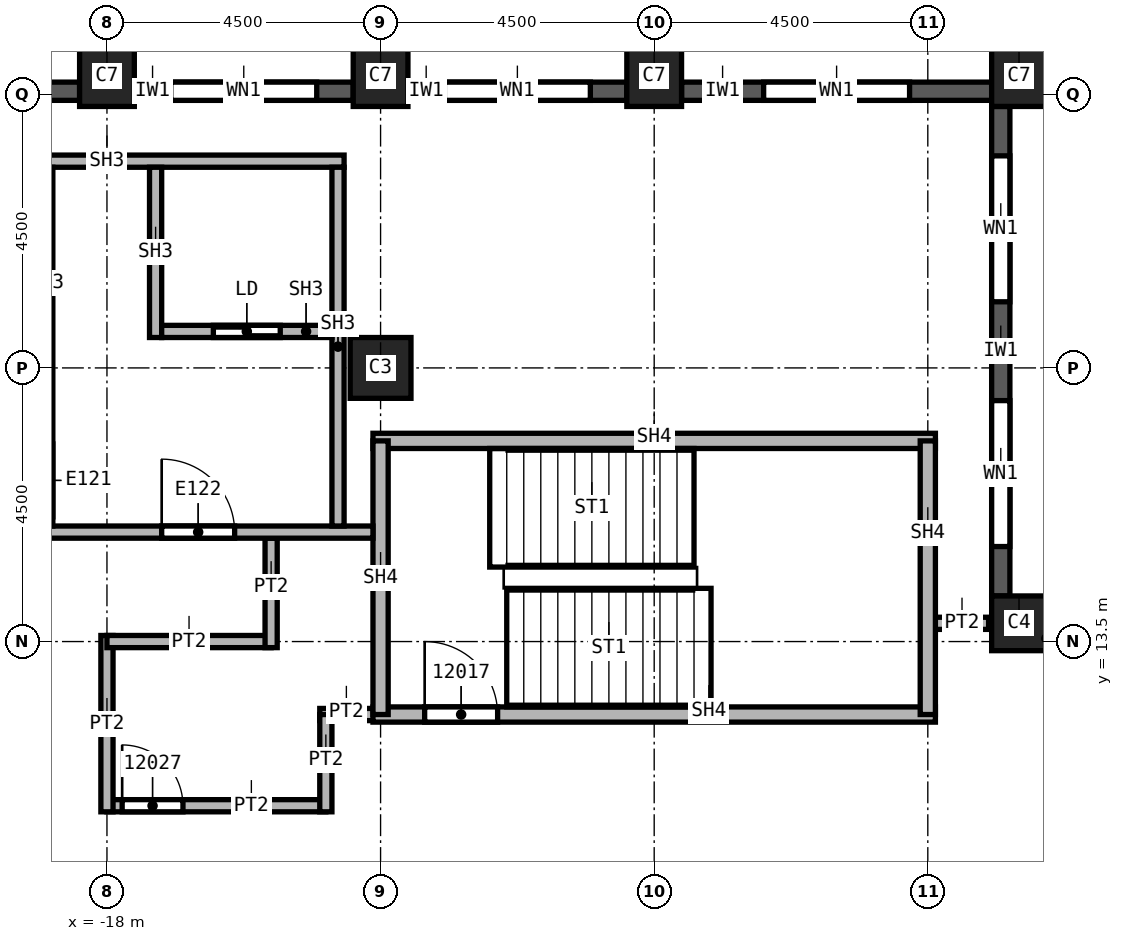
"""IFC4 building model, lengths in metres.
Left out: names, types, materials, properties, quantities, classifications, styles, units other than length and angle.
Written with IfcOpenShell. Run it as: python <this file> out.ifc"""

import sys

from ifc_helpers import new_model, si_unit, direction, frame, frame_2d, origin, origin_2d, place, context, subcontext, project, spatial, rectangle, extrude, element, fill, save


model = new_model("IFC4")
c1 = context("Model", 3, precision=1e-05, world=origin(), true_north=direction((0.0, 1.0)))
c2 = subcontext(c1, "Body", "Model", "MODEL_VIEW")
j1 = project(units=[si_unit("LENGTHUNIT", "METRE"), si_unit("PLANEANGLEUNIT", "RADIAN")], contexts=[c1])
p1 = place(None, origin())
s1 = spatial("IfcSite", under=j1, at=p1, CompositionType="ELEMENT")
p2 = place(p1, origin())
s2 = spatial("IfcBuilding", under=s1, at=p2, CompositionType="ELEMENT")
p3 = place(p2, frame((0.0, 0.0, 196.0)))
s3 = spatial("IfcBuildingStorey", under=s2, at=p3, CompositionType="ELEMENT", Elevation=196.0)
p4 = place(p3, frame((-13.5, 18.0, 0.0), z_axis=(0.0, 0.0, 1.0), x_axis=(1.0, 0.0, 0.0)))
e1 = element("IfcColumn", 1, at=p4, inside=s3, PredefinedType="COLUMN", context=c2, shape_type="SweptSolid", body=[
    extrude(rectangle(XDim=1.0, YDim=1.0, at=origin_2d()), origin(), (0.0, 0.0, 1.0), 3.72),
])
for number, where, z_axis, x_axis in (
    (2, (-3.0, 22.8, 0.0), (0.0, 0.0, 1.0), (1.0, 0.0, 0.0)),
    (3, (-9.0, 22.8, 0.0), (0.0, 0.0, 1.0), (1.0, 0.0, 0.0)),
    (4, (-13.5, 22.8, 0.0), (0.0, 0.0, 1.0), (1.0, 0.0, 0.0)),
    (5, (-18.0, 22.8, 0.0), (0.0, 0.0, 1.0), (1.0, 0.0, 0.0)),
):
    element("IfcColumn", number, at=place(p3, frame(where, z_axis=z_axis, x_axis=x_axis)), inside=s3, PredefinedType="COLUMN", context=c2, shape_type="SweptSolid", body=[
        extrude(rectangle(XDim=0.9, YDim=1.0, at=origin_2d()), origin(), (0.0, 0.0, 1.0), 3.72),
    ])
p5 = place(p3, frame((-3.0, 13.8, 0.0), z_axis=(0.0, 0.0, 1.0), x_axis=(1.0, 0.0, 0.0)))
e6 = element("IfcColumn", 6, at=p5, inside=s3, PredefinedType="COLUMN", context=c2, shape_type="SweptSolid", body=[
    extrude(rectangle(XDim=0.9, YDim=0.9, at=origin_2d()), origin(), (0.0, 0.0, 1.0), 3.72),
])
p6 = place(p3, frame((-3.3, 14.25, 0.0), z_axis=(0.0, 0.0, 1.0), x_axis=(0.0, 1.0, 0.0)))
e7 = element("IfcWall", 7, at=p6, inside=s3, PredefinedType="SOLIDWALL", context=c2, shape_type="SweptSolid", body=[
    extrude(rectangle(XDim=8.05, YDim=0.3, at=frame_2d((4.025, 0.0))), origin(), (0.0, 0.0, 1.0), 3.12),
])
p7 = place(p6, frame((0.812, 0.0, 0.8)))
e8 = element("IfcOpeningElement", 8, at=p7, cuts=e7, PredefinedType="OPENING", context=c2, shape_type="SweptSolid", body=[
    extrude(rectangle(XDim=2.4, YDim=1.95, at=frame_2d((1.2, 0.975))), frame((0.0, 0.15, 0.0), z_axis=(0.0, -1.0, 0.0), x_axis=(1.0, 0.0, 0.0)), (0.0, 0.0, 1.0), 0.3),
])
p8 = place(p6, frame((4.837, 0.0, 0.8)))
e9 = element("IfcOpeningElement", 9, at=p8, cuts=e7, PredefinedType="OPENING", context=c2, shape_type="SweptSolid", body=[
    extrude(rectangle(XDim=2.4, YDim=1.95, at=frame_2d((1.2, 0.975))), frame((0.0, 0.15, 0.0), z_axis=(0.0, -1.0, 0.0), x_axis=(1.0, 0.0, 0.0)), (0.0, 0.0, 1.0), 0.3),
])
p9 = place(p3, frame((-3.45, 22.55, 0.0), z_axis=(0.0, 0.0, 1.0), x_axis=(-1.0, 0.0, 0.0)))
e10 = element("IfcWall", 10, at=p9, inside=s3, PredefinedType="SOLIDWALL", context=c2, shape_type="SweptSolid", body=[
    extrude(rectangle(XDim=5.1, YDim=0.3, at=frame_2d((2.55, 0.0))), origin(), (0.0, 0.0, 1.0), 3.12),
])
p10 = place(p9, frame((1.35, 0.0, 0.8)))
e11 = element("IfcOpeningElement", 11, at=p10, cuts=e10, PredefinedType="OPENING", context=c2, shape_type="SweptSolid", body=[
    extrude(rectangle(XDim=2.4, YDim=1.95, at=frame_2d((1.2, 0.975))), frame((0.0, 0.15, 0.0), z_axis=(0.0, -1.0, 0.0), x_axis=(1.0, 0.0, 0.0)), (0.0, 0.0, 1.0), 0.3),
])
p11 = place(p3, frame((-9.45, 22.55, 0.0), z_axis=(0.0, 0.0, 1.0), x_axis=(-1.0, 0.0, 0.0)))
e12 = element("IfcWall", 12, at=p11, inside=s3, PredefinedType="SOLIDWALL", context=c2, shape_type="SweptSolid", body=[
    extrude(rectangle(XDim=3.6, YDim=0.3, at=frame_2d((1.8, 0.0))), origin(), (0.0, 0.0, 1.0), 3.12),
])
p12 = place(p11, frame((0.6, 0.0, 0.8)))
e13 = element("IfcOpeningElement", 13, at=p12, cuts=e12, PredefinedType="OPENING", context=c2, shape_type="SweptSolid", body=[
    extrude(rectangle(XDim=2.4, YDim=1.95, at=frame_2d((1.2, 0.975))), frame((0.0, 0.15, 0.0), z_axis=(0.0, -1.0, 0.0), x_axis=(1.0, 0.0, 0.0)), (0.0, 0.0, 1.0), 0.3),
])
p13 = place(p3, frame((-13.95, 22.55, 0.0), z_axis=(0.0, 0.0, 1.0), x_axis=(-1.0, 0.0, 0.0)))
e14 = element("IfcWall", 14, at=p13, inside=s3, PredefinedType="SOLIDWALL", context=c2, shape_type="SweptSolid", body=[
    extrude(rectangle(XDim=3.6, YDim=0.3, at=frame_2d((1.8, 0.0))), origin(), (0.0, 0.0, 1.0), 3.12),
])
p14 = place(p13, frame((0.6, 0.0, 0.8)))
e15 = element("IfcOpeningElement", 15, at=p14, cuts=e14, PredefinedType="OPENING", context=c2, shape_type="SweptSolid", body=[
    extrude(rectangle(XDim=2.4, YDim=1.95, at=frame_2d((1.2, 0.975))), frame((0.0, 0.15, 0.0), z_axis=(0.0, -1.0, 0.0), x_axis=(1.0, 0.0, 0.0)), (0.0, 0.0, 1.0), 0.3),
])
p15 = place(p3, frame((-18.45, 22.55, 0.0), z_axis=(0.0, 0.0, 1.0), x_axis=(-1.0, 0.0, 0.0)))
e16 = element("IfcWall", 16, at=p15, inside=s3, PredefinedType="SOLIDWALL", context=c2, shape_type="SweptSolid", body=[
    extrude(rectangle(XDim=3.6, YDim=0.3, at=frame_2d((1.8, 0.0))), origin(), (0.0, 0.0, 1.0), 3.12),
])
p16 = place(p15, frame((0.6, 0.0, 0.8)))
e17 = element("IfcOpeningElement", 17, at=p16, cuts=e16, PredefinedType="OPENING", context=c2, shape_type="SweptSolid", body=[
    extrude(rectangle(XDim=2.4, YDim=1.95, at=frame_2d((1.2, 0.975))), frame((0.0, 0.15, 0.0), z_axis=(0.0, -1.0, 0.0), x_axis=(1.0, 0.0, 0.0)), (0.0, 0.0, 1.0), 0.3),
])
p17 = place(p3, frame((-18.0, 10.8, 0.0), z_axis=(0.0, 0.0, 1.0), x_axis=(1.0, 0.0, 0.0)))
e18 = element("IfcWall", 18, at=p17, inside=s3, PredefinedType="PARTITIONING", context=c2, shape_type="SweptSolid", body=[
    extrude(rectangle(XDim=3.6, YDim=0.2, at=frame_2d((1.8, 0.0))), origin(), (0.0, 0.0, 1.0), 3.72),
])
p18 = place(p17, frame((0.25, 0.0, 0.0)))
e19 = element("IfcOpeningElement", 19, at=p18, cuts=e18, PredefinedType="OPENING", context=c2, shape_type="SweptSolid", body=[
    extrude(rectangle(XDim=1.0, YDim=2.1, at=frame_2d((0.5, 1.05))), frame((0.0, 0.1, 0.0), z_axis=(0.0, -1.0, 0.0), x_axis=(1.0, 0.0, 0.0)), (0.0, 0.0, 1.0), 0.2),
])
p19 = place(p3, frame((-18.0, 13.6, 0.0), z_axis=(0.0, 0.0, 1.0), x_axis=(0.0, -1.0, 0.0)))
e20 = element("IfcWall", 20, at=p19, inside=s3, PredefinedType="PARTITIONING", context=c2, shape_type="SweptSolid", body=[
    extrude(rectangle(XDim=2.9, YDim=0.2, at=frame_2d((1.45, 0.0))), origin(), (0.0, 0.0, 1.0), 3.72),
])
p20 = place(p3, frame((-15.3, 13.5, 0.0), z_axis=(0.0, 0.0, 1.0), x_axis=(-1.0, 0.0, 0.0)))
e21 = element("IfcWall", 21, at=p20, inside=s3, PredefinedType="PARTITIONING", context=c2, shape_type="SweptSolid", body=[
    extrude(rectangle(XDim=2.7, YDim=0.2, at=frame_2d((1.35, 0.0))), origin(), (0.0, 0.0, 1.0), 3.72),
])
p21 = place(p3, frame((-15.3, 15.2, 0.0), z_axis=(0.0, 0.0, 1.0), x_axis=(0.0, -1.0, 0.0)))
e22 = element("IfcWall", 22, at=p21, inside=s3, PredefinedType="PARTITIONING", context=c2, shape_type="SweptSolid", body=[
    extrude(rectangle(XDim=1.8, YDim=0.2, at=frame_2d((0.9, 0.0))), origin(), (0.0, 0.0, 1.0), 3.72),
])
p22 = place(p3, frame((-14.5, 12.3, 0.0), z_axis=(0.0, 0.0, 1.0), x_axis=(1.0, 0.0, 0.0)))
e23 = element("IfcWall", 23, at=p22, inside=s3, PredefinedType="PARTITIONING", context=c2, shape_type="SweptSolid", body=[
    extrude(rectangle(XDim=1.125, YDim=0.2, at=frame_2d((0.562, 0.0))), origin(), (0.0, 0.0, 1.0), 3.72),
])
p23 = place(p3, frame((-14.4, 10.7, 0.0), z_axis=(0.0, 0.0, 1.0), x_axis=(0.0, 1.0, 0.0)))
e24 = element("IfcWall", 24, at=p23, inside=s3, PredefinedType="PARTITIONING", context=c2, shape_type="SweptSolid", body=[
    extrude(rectangle(XDim=1.6, YDim=0.2, at=frame_2d((0.8, 0.0))), origin(), (0.0, 0.0, 1.0), 3.72),
])
p24 = place(p3, frame((-4.5, 13.8, 0.0), z_axis=(0.0, 0.0, 1.0), x_axis=(1.0, 0.0, 0.0)))
e25 = element("IfcWall", 25, at=p24, inside=s3, PredefinedType="PARTITIONING", context=c2, shape_type="SweptSolid", body=[
    extrude(rectangle(XDim=1.0, YDim=0.2, at=frame_2d((0.5, 0.0))), origin(), (0.0, 0.0, 1.0), 3.72),
])
p25 = place(p3, frame((-13.625, 12.3, 0.0), z_axis=(0.0, 0.0, 1.0), x_axis=(1.0, 0.0, 0.0)))
e26 = element("IfcWall", 26, at=p25, inside=s3, PredefinedType="SOLIDWALL", context=c2, shape_type="SweptSolid", body=[
    extrude(rectangle(XDim=9.25, YDim=0.25, at=frame_2d((4.625, 0.0))), origin(), (0.0, 0.0, 1.0), 3.72),
])
p26 = place(p25, frame((0.85, 0.0, 0.0)))
e27 = element("IfcOpeningElement", 27, at=p26, cuts=e26, PredefinedType="OPENING", context=c2, shape_type="SweptSolid", body=[
    extrude(rectangle(XDim=1.2, YDim=2.1, at=frame_2d((0.6, 1.05))), frame((0.0, 0.125, 0.0), z_axis=(0.0, -1.0, 0.0), x_axis=(1.0, 0.0, 0.0)), (0.0, 0.0, 1.0), 0.25),
])
p27 = place(p3, frame((-13.625, 16.8, 0.0), z_axis=(0.0, 0.0, 1.0), x_axis=(1.0, 0.0, 0.0)))
e28 = element("IfcWall", 28, at=p27, inside=s3, PredefinedType="SOLIDWALL", context=c2, shape_type="SweptSolid", body=[
    extrude(rectangle(XDim=9.25, YDim=0.25, at=frame_2d((4.625, 0.0))), origin(), (0.0, 0.0, 1.0), 3.72),
])
for number, where, z_axis, x_axis in (
    (29, (-13.5, 12.3, 0.0), (0.0, 0.0, 1.0), (0.0, 1.0, 0.0)),
    (30, (-4.5, 16.8, 0.0), (0.0, 0.0, 1.0), (0.0, -1.0, 0.0)),
):
    element("IfcWall", number, at=place(p3, frame(where, z_axis=z_axis, x_axis=x_axis)), inside=s3, PredefinedType="SOLIDWALL", context=c2, shape_type="SweptSolid", body=[
        extrude(rectangle(XDim=4.5, YDim=0.25, at=frame_2d((2.25, 0.0))), origin(), (0.0, 0.0, 1.0), 3.72),
    ])
p28 = place(p3, frame((-21.9, 15.3, 0.0), z_axis=(0.0, 0.0, 1.0), x_axis=(1.0, 0.0, 0.0)))
e31 = element("IfcWall", 31, at=p28, inside=s3, PredefinedType="SOLIDWALL", context=c2, shape_type="SweptSolid", body=[
    extrude(rectangle(XDim=8.275, YDim=0.2, at=frame_2d((4.137, 0.0))), origin(), (0.0, 0.0, 1.0), 3.72),
])
p29 = place(p28, frame((4.8, 0.0, 0.0)))
e32 = element("IfcOpeningElement", 32, at=p29, cuts=e31, PredefinedType="OPENING", context=c2, shape_type="SweptSolid", body=[
    extrude(rectangle(XDim=1.2, YDim=2.1, at=frame_2d((0.6, 1.05))), frame((0.0, 0.1, 0.0), z_axis=(0.0, -1.0, 0.0), x_axis=(1.0, 0.0, 0.0)), (0.0, 0.0, 1.0), 0.2),
])
p30 = place(p3, frame((-21.9, 21.4, 0.0), z_axis=(0.0, 0.0, 1.0), x_axis=(1.0, 0.0, 0.0)))
e33 = element("IfcWall", 33, at=p30, inside=s3, PredefinedType="SOLIDWALL", context=c2, shape_type="SweptSolid", body=[
    extrude(rectangle(XDim=7.8, YDim=0.2, at=frame_2d((3.9, 0.0))), origin(), (0.0, 0.0, 1.0), 3.72),
])
p31 = place(p3, frame((-14.2, 15.4, 0.0), z_axis=(0.0, 0.0, 1.0), x_axis=(0.0, 1.0, 0.0)))
e34 = element("IfcWall", 34, at=p31, inside=s3, PredefinedType="SOLIDWALL", context=c2, shape_type="SweptSolid", body=[
    extrude(rectangle(XDim=5.9, YDim=0.2, at=frame_2d((2.95, 0.0))), origin(), (0.0, 0.0, 1.0), 3.72),
])
p32 = place(p3, frame((-18.99, 15.4, 0.0), z_axis=(0.0, 0.0, 1.0), x_axis=(0.0, 1.0, 0.0)))
e35 = element("IfcWall", 35, at=p32, inside=s3, PredefinedType="SOLIDWALL", context=c2, shape_type="SweptSolid", body=[
    extrude(rectangle(XDim=5.9, YDim=0.2, at=frame_2d((2.95, 0.0))), origin(), (0.0, 0.0, 1.0), 3.72),
])
p33 = place(p32, frame((0.15, 0.0, 0.0)))
e36 = element("IfcOpeningElement", 36, at=p33, cuts=e35, PredefinedType="OPENING", context=c2, shape_type="SweptSolid", body=[
    extrude(rectangle(XDim=1.2, YDim=2.1, at=frame_2d((0.6, 1.05))), frame((0.0, 0.1, 0.0), z_axis=(0.0, -1.0, 0.0), x_axis=(1.0, 0.0, 0.0)), (0.0, 0.0, 1.0), 0.2),
])
p34 = place(p3, frame((-17.2, 18.5, 0.0), z_axis=(0.0, 0.0, 1.0), x_axis=(0.0, 1.0, 0.0)))
e37 = element("IfcWall", 37, at=p34, inside=s3, PredefinedType="SOLIDWALL", context=c2, shape_type="SweptSolid", body=[
    extrude(rectangle(XDim=2.8, YDim=0.2, at=frame_2d((1.4, 0.0))), origin(), (0.0, 0.0, 1.0), 3.72),
])
p35 = place(p3, frame((-17.1, 18.6, 0.0), z_axis=(0.0, 0.0, 1.0), x_axis=(1.0, 0.0, 0.0)))
e38 = element("IfcWall", 38, at=p35, inside=s3, PredefinedType="SOLIDWALL", context=c2, shape_type="SweptSolid", body=[
    extrude(rectangle(XDim=2.8, YDim=0.2, at=frame_2d((1.4, 0.0))), origin(), (0.0, 0.0, 1.0), 3.72),
])
p36 = place(p35, frame((0.85, 0.0, 0.0)))
e39 = element("IfcOpeningElement", 39, at=p36, cuts=e38, PredefinedType="OPENING", context=c2, shape_type="SweptSolid", body=[
    extrude(rectangle(XDim=1.1, YDim=2.1, at=frame_2d((0.55, 1.05))), frame((0.0, 0.1, 0.0), z_axis=(0.0, -1.0, 0.0), x_axis=(1.0, 0.0, 0.0)), (0.0, 0.0, 1.0), 0.2),
])
p37 = place(p7, origin())
e40 = element("IfcWindow", 40, at=p37, inside=s3, PartitioningType="SINGLE_PANEL", PredefinedType="WINDOW", context=c2, shape_type="SweptSolid", body=[
    extrude(rectangle(XDim=2.4, YDim=1.95, at=frame_2d((1.2, 0.975))), frame((0.0, 0.03, 0.0), z_axis=(0.0, -1.0, 0.0), x_axis=(1.0, 0.0, 0.0)), (0.0, 0.0, 1.0), 0.06),
])
fill(e8, e40)
p38 = place(p8, origin())
e41 = element("IfcWindow", 41, at=p38, inside=s3, PartitioningType="SINGLE_PANEL", PredefinedType="WINDOW", context=c2, shape_type="SweptSolid", body=[
    extrude(rectangle(XDim=2.4, YDim=1.95, at=frame_2d((1.2, 0.975))), frame((0.0, 0.03, 0.0), z_axis=(0.0, -1.0, 0.0), x_axis=(1.0, 0.0, 0.0)), (0.0, 0.0, 1.0), 0.06),
])
fill(e9, e41)
p39 = place(p10, origin())
e42 = element("IfcWindow", 42, at=p39, inside=s3, PartitioningType="SINGLE_PANEL", PredefinedType="WINDOW", context=c2, shape_type="SweptSolid", body=[
    extrude(rectangle(XDim=2.4, YDim=1.95, at=frame_2d((1.2, 0.975))), frame((0.0, 0.03, 0.0), z_axis=(0.0, -1.0, 0.0), x_axis=(1.0, 0.0, 0.0)), (0.0, 0.0, 1.0), 0.06),
])
fill(e11, e42)
p40 = place(p12, origin())
e43 = element("IfcWindow", 43, at=p40, inside=s3, PartitioningType="SINGLE_PANEL", PredefinedType="WINDOW", context=c2, shape_type="SweptSolid", body=[
    extrude(rectangle(XDim=2.4, YDim=1.95, at=frame_2d((1.2, 0.975))), frame((0.0, 0.03, 0.0), z_axis=(0.0, -1.0, 0.0), x_axis=(1.0, 0.0, 0.0)), (0.0, 0.0, 1.0), 0.06),
])
fill(e13, e43)
p41 = place(p14, origin())
e44 = element("IfcWindow", 44, at=p41, inside=s3, PartitioningType="SINGLE_PANEL", PredefinedType="WINDOW", context=c2, shape_type="SweptSolid", body=[
    extrude(rectangle(XDim=2.4, YDim=1.95, at=frame_2d((1.2, 0.975))), frame((0.0, 0.03, 0.0), z_axis=(0.0, -1.0, 0.0), x_axis=(1.0, 0.0, 0.0)), (0.0, 0.0, 1.0), 0.06),
])
fill(e15, e44)
p42 = place(p26, origin())
e45 = element("IfcDoor", 45, at=p42, inside=s3, OperationType="SINGLE_SWING_RIGHT", PredefinedType="DOOR", context=c2, shape_type="SweptSolid", body=[
    extrude(rectangle(XDim=1.2, YDim=2.1, at=frame_2d((0.6, 1.05))), frame((0.0, 0.025, 0.0), z_axis=(0.0, -1.0, 0.0), x_axis=(1.0, 0.0, 0.0)), (0.0, 0.0, 1.0), 0.05),
])
fill(e27, e45)
p43 = place(p18, origin())
e46 = element("IfcDoor", 46, at=p43, inside=s3, OperationType="SINGLE_SWING_RIGHT", PredefinedType="DOOR", context=c2, shape_type="SweptSolid", body=[
    extrude(rectangle(XDim=1.0, YDim=2.1, at=frame_2d((0.5, 1.05))), frame((0.0, 0.025, 0.0), z_axis=(0.0, -1.0, 0.0), x_axis=(1.0, 0.0, 0.0)), (0.0, 0.0, 1.0), 0.05),
])
fill(e19, e46)
p44 = place(p36, origin())
e47 = element("IfcDoor", 47, at=p44, inside=s3, OperationType="SLIDING_TO_LEFT", PredefinedType="DOOR", context=c2, shape_type="SweptSolid", body=[
    extrude(rectangle(XDim=1.1, YDim=2.1, at=frame_2d((0.55, 1.05))), frame((0.0, 0.025, 0.0), z_axis=(0.0, -1.0, 0.0), x_axis=(1.0, 0.0, 0.0)), (0.0, 0.0, 1.0), 0.05),
])
fill(e39, e47)
p45 = place(p29, origin())
e48 = element("IfcDoor", 48, at=p45, inside=s3, OperationType="SINGLE_SWING_RIGHT", PredefinedType="DOOR", context=c2, shape_type="SweptSolid", body=[
    extrude(rectangle(XDim=1.2, YDim=2.1, at=frame_2d((0.6, 1.05))), frame((0.0, 0.025, 0.0), z_axis=(0.0, -1.0, 0.0), x_axis=(1.0, 0.0, 0.0)), (0.0, 0.0, 1.0), 0.05),
])
fill(e32, e48)
save(model, sys.argv[1])
